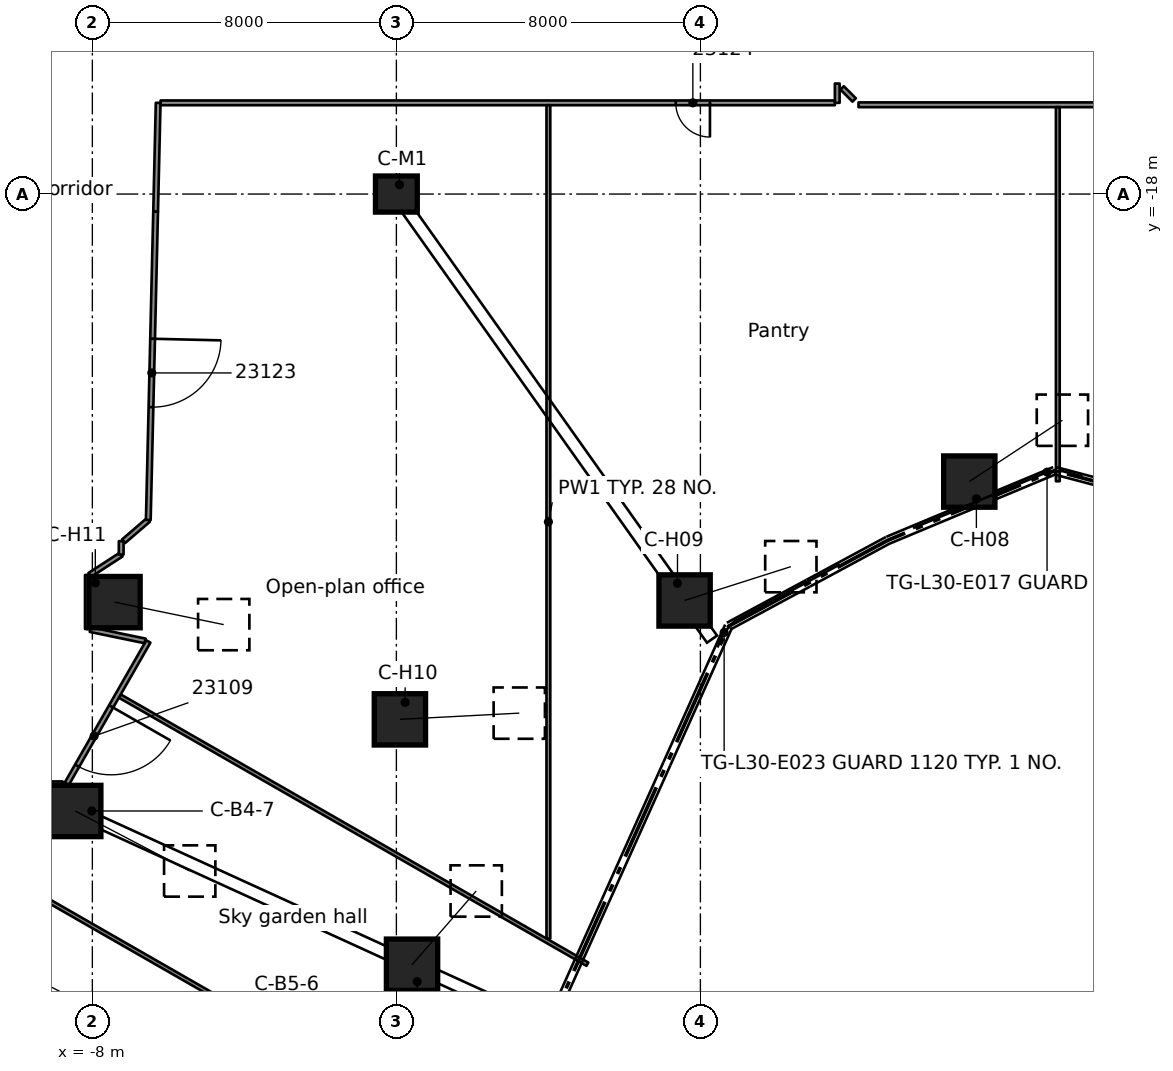
"""IFC4 building model, lengths in metres.
Left out: names, types, materials, properties, quantities, classifications, styles, units other than length and angle.
Written with IfcOpenShell. Run it as: python <this file> out.ifc"""

import sys

from ifc_helpers import new_model, si_unit, direction, frame, frame_2d, origin, origin_2d, place, context, subcontext, project, spatial, rectangle, extrude, element, fill, save


model = new_model("IFC4")
c1 = context("Model", 3, precision=1e-05, world=origin(), true_north=direction((0.0, 1.0)))
c2 = subcontext(c1, "Body", "Model", "MODEL_VIEW")
j1 = project(units=[si_unit("LENGTHUNIT", "METRE"), si_unit("PLANEANGLEUNIT", "RADIAN")], contexts=[c1])
p1 = place(None, origin())
s1 = spatial("IfcSite", under=j1, at=p1, CompositionType="ELEMENT")
p2 = place(p1, origin())
s2 = spatial("IfcBuilding", under=s1, at=p2, CompositionType="ELEMENT")
p3 = place(p2, frame((0.0, 0.0, 119.7)))
s3 = spatial("IfcBuildingStorey", under=s2, at=p3, CompositionType="ELEMENT", Elevation=119.7)
p4 = place(p3, frame((-10.639, -38.05, 0.537), z_axis=(0.704636789629, -0.368256969332, 0.606526008709), x_axis=(0.463179232644, 0.886264632289, 0.0)))
e1 = element("IfcColumn", 1, at=p4, inside=s3, PredefinedType="COLUMN", context=c2, shape_type="SweptSolid", body=[
    extrude(rectangle(XDim=1.35, YDim=1.35, at=origin_2d()), origin(), (0.0, 0.0, 1.0), 4.825),
])
p5 = place(p3, frame((-8.45, -34.233, 0.507), z_axis=(0.665591708259, -0.348954135448, 0.659711064975), x_axis=(0.464331547089, 0.88566145585, 0.0)))
e2 = element("IfcColumn", 2, at=p5, inside=s3, PredefinedType="COLUMN", context=c2, shape_type="SweptSolid", body=[
    extrude(rectangle(XDim=1.35, YDim=1.35, at=origin_2d()), origin(), (0.0, 0.0, 1.0), 4.525),
])
p6 = place(p3, frame((0.412, -38.278, 0.427), z_axis=(0.415654090465, 0.477479482065, 0.774109179178), x_axis=(-0.754249881961, 0.656587477464, 0.0)))
e3 = element("IfcColumn", 3, at=p6, inside=s3, PredefinedType="COLUMN", context=c2, shape_type="SweptSolid", body=[
    extrude(rectangle(XDim=1.35, YDim=1.35, at=origin_2d()), origin(), (0.0, 0.0, 1.0), 4.063),
])
p7 = place(p3, frame((15.076, -25.565, 0.467), z_axis=(0.57724832469, 0.380287859943, 0.722610209742), x_axis=(-0.550140625577, 0.835072028085, 0.0)))
e4 = element("IfcColumn", 4, at=p7, inside=s3, PredefinedType="COLUMN", context=c2, shape_type="SweptSolid", body=[
    extrude(rectangle(XDim=1.35, YDim=1.35, at=origin_2d()), origin(), (0.0, 0.0, 1.0), 4.244),
])
p8 = place(p3, frame((7.584, -28.694, 0.467), z_axis=(0.658720900621, 0.20971851237, 0.722568280964), x_axis=(-0.303368503341, 0.95287331329, 0.0)))
e5 = element("IfcColumn", 5, at=p8, inside=s3, PredefinedType="COLUMN", context=c2, shape_type="SweptSolid", body=[
    extrude(rectangle(XDim=1.35, YDim=1.35, at=origin_2d()), origin(), (0.0, 0.0, 1.0), 4.244),
])
p9 = place(p3, frame((0.093, -31.822, 0.486), z_axis=(0.719490424028, 0.037582399141, 0.693484746052), x_axis=(-0.052163630494, 0.998638551055, 0.0)))
e6 = element("IfcColumn", 6, at=p9, inside=s3, PredefinedType="COLUMN", context=c2, shape_type="SweptSolid", body=[
    extrude(rectangle(XDim=1.35, YDim=1.35, at=origin_2d()), origin(), (0.0, 0.0, 1.0), 4.365),
])
p10 = place(p3, frame((-7.417, -28.737, 0.467), z_axis=(0.677134223786, -0.139487809436, 0.722518092505), x_axis=(0.201760907316, 0.979434804507, 0.0)))
e7 = element("IfcColumn", 7, at=p10, inside=s3, PredefinedType="COLUMN", context=c2, shape_type="SweptSolid", body=[
    extrude(rectangle(XDim=1.35, YDim=1.35, at=origin_2d()), origin(), (0.0, 0.0, 1.0), 4.244),
])
p11 = place(p3, frame((0.0, -18.0, 0.0), z_axis=(0.0, 0.0, 1.0), x_axis=(1.0, 0.0, 0.0)))
e8 = element("IfcColumn", 8, at=p11, inside=s3, PredefinedType="COLUMN", context=c2, shape_type="SweptSolid", body=[
    extrude(rectangle(XDim=1.1, YDim=0.95, at=origin_2d()), origin(), (0.0, 0.0, 1.0), 4.0),
])
p12 = place(p3, frame((11.729, -15.207, 0.0), z_axis=(0.0, 0.0, 1.0), x_axis=(0.707106781187, -0.707106781187, 0.0)))
e9 = element("IfcWall", 9, at=p12, inside=s3, PredefinedType="PARTITIONING", context=c2, shape_type="SweptSolid", body=[
    extrude(rectangle(XDim=0.448, YDim=0.125, at=frame_2d((0.224, 0.0))), origin(), (0.0, 0.0, 1.0), 3.58),
])
p13 = place(p3, frame((-10.067, -36.073, 0.0), z_axis=(0.0, 0.0, 1.0), x_axis=(0.867487826892, -0.497458410518, 0.0)))
e10 = element("IfcWall", 10, at=p13, inside=s3, PredefinedType="PARTITIONING", context=c2, shape_type="SweptSolid", body=[
    extrude(rectangle(XDim=14.739, YDim=0.1, at=frame_2d((7.37, 0.0))), origin(), (0.0, 0.0, 1.0), 3.58),
])
p14 = place(p3, frame((-7.278, -31.209, 0.0), z_axis=(0.0, 0.0, 1.0), x_axis=(0.867510224985, -0.497419349791, 0.0)))
e11 = element("IfcWall", 11, at=p14, inside=s3, PredefinedType="PARTITIONING", context=c2, shape_type="SweptSolid", body=[
    extrude(rectangle(XDim=14.183, YDim=0.1, at=frame_2d((7.092, 0.0))), origin(), (0.0, 0.0, 1.0), 3.58),
])
p15 = place(p3, frame((-8.056, -29.46, 0.0), z_axis=(0.0, 0.0, 1.0), x_axis=(0.979345303745, -0.202194896157, 0.0)))
e12 = element("IfcWall", 12, at=p15, inside=s3, PredefinedType="PARTITIONING", context=c2, shape_type="SweptSolid", body=[
    extrude(rectangle(XDim=1.474, YDim=0.125, at=frame_2d((0.737, 0.0))), origin(), (0.0, 0.0, 1.0), 3.58),
])
p16 = place(p3, frame((-7.179, -27.136, 0.0), z_axis=(0.0, 0.0, 1.0), x_axis=(0.758010873783, 0.65224191465, 0.0)))
e13 = element("IfcWall", 13, at=p16, inside=s3, PredefinedType="PARTITIONING", context=c2, shape_type="SweptSolid", body=[
    extrude(rectangle(XDim=0.859, YDim=0.125, at=frame_2d((0.429, 0.0))), origin(), (0.0, 0.0, 1.0), 3.58),
])
p17 = place(p3, frame((-9.164, -33.518, 0.0), z_axis=(0.0, 0.0, 1.0), x_axis=(1.0, 0.0, 0.0)))
e14 = element("IfcWall", 14, at=p17, inside=s3, PredefinedType="PARTITIONING", context=c2, shape_type="SweptSolid", body=[
    extrude(rectangle(XDim=0.382, YDim=0.125, at=frame_2d((0.191, 0.0))), origin(), (0.0, 0.0, 1.0), 3.58),
])
p18 = place(p3, frame((-8.069, -28.022, 0.0), z_axis=(0.0, 0.0, 1.0), x_axis=(0.839550235138, 0.543282065486, 0.0)))
e15 = element("IfcWall", 15, at=p18, inside=s3, PredefinedType="PARTITIONING", context=c2, shape_type="SweptSolid", body=[
    extrude(rectangle(XDim=0.986, YDim=0.125, at=frame_2d((0.493, 0.0))), origin(), (0.0, 0.0, 1.0), 3.58),
])
p19 = place(p3, frame((22.575, -15.651, 0.0), z_axis=(0.0, 0.0, 1.0), x_axis=(-1.0, 0.0, 0.0)))
e16 = element("IfcWall", 16, at=p19, inside=s3, PredefinedType="PARTITIONING", context=c2, shape_type="SweptSolid", body=[
    extrude(rectangle(XDim=10.415, YDim=0.125, at=frame_2d((5.208, 0.0))), origin(), (0.0, 0.0, 1.0), 3.58),
])
p20 = place(p19, frame((2.025, 0.0, 0.0)))
e17 = element("IfcOpeningElement", 17, at=p20, cuts=e16, PredefinedType="OPENING", context=c2, shape_type="SweptSolid", body=[
    extrude(rectangle(XDim=1.1, YDim=2.1, at=frame_2d((0.55, 1.05))), frame((0.0, 0.073, 0.0), z_axis=(0.0, -1.0, 0.0), x_axis=(1.0, 0.0, 0.0)), (0.0, 0.0, 1.0), 0.145),
])
p21 = place(p3, frame((11.539, -15.6, 0.0), z_axis=(0.0, 0.0, 1.0), x_axis=(-1.0, 0.0, 0.0)))
e18 = element("IfcWall", 18, at=p21, inside=s3, PredefinedType="PARTITIONING", context=c2, shape_type="SweptSolid", body=[
    extrude(rectangle(XDim=17.744, YDim=0.125, at=frame_2d((8.872, 0.0))), origin(), (0.0, 0.0, 1.0), 3.58),
])
p22 = place(p21, frame((3.288, 0.0, 0.0)))
e19 = element("IfcOpeningElement", 19, at=p22, cuts=e18, PredefinedType="OPENING", context=c2, shape_type="SweptSolid", body=[
    extrude(rectangle(XDim=0.9, YDim=2.1, at=frame_2d((0.45, 1.05))), frame((0.0, 0.073, 0.0), z_axis=(0.0, -1.0, 0.0), x_axis=(1.0, 0.0, 0.0)), (0.0, 0.0, 1.0), 0.145),
])
p23 = place(p3, frame((-6.526, -29.773, 0.0), z_axis=(0.0, 0.0, 1.0), x_axis=(-0.497557170908, -0.867431185558, 0.0)))
e20 = element("IfcWall", 20, at=p23, inside=s3, PredefinedType="PARTITIONING", context=c2, shape_type="SweptSolid", body=[
    extrude(rectangle(XDim=4.317, YDim=0.125, at=frame_2d((2.159, 0.0))), origin(), (0.0, 0.0, 1.0), 3.58),
])
p24 = place(p23, frame((1.969, 0.0, 0.0)))
e21 = element("IfcOpeningElement", 21, at=p24, cuts=e20, PredefinedType="OPENING", context=c2, shape_type="SweptSolid", body=[
    extrude(rectangle(XDim=1.8, YDim=2.1, at=frame_2d((0.9, 1.05))), frame((0.0, 0.073, 0.0), z_axis=(0.0, -1.0, 0.0), x_axis=(1.0, 0.0, 0.0)), (0.0, 0.0, 1.0), 0.145),
])
p25 = place(p3, frame((-6.335, -18.458, 0.0), z_axis=(0.0, 0.0, 1.0), x_axis=(-0.02378203, -0.999717167527, 0.0)))
e22 = element("IfcWall", 22, at=p25, inside=s3, PredefinedType="PARTITIONING", context=c2, shape_type="SweptSolid", body=[
    extrude(rectangle(XDim=8.12, YDim=0.125, at=frame_2d((4.06, 0.0))), origin(), (0.0, 0.0, 1.0), 3.58),
])
p26 = place(p25, frame((3.35, 0.0, 0.0)))
e23 = element("IfcOpeningElement", 23, at=p26, cuts=e22, PredefinedType="OPENING", context=c2, shape_type="SweptSolid", body=[
    extrude(rectangle(XDim=1.8, YDim=2.1, at=frame_2d((0.9, 1.05))), frame((0.0, 0.073, 0.0), z_axis=(0.0, -1.0, 0.0), x_axis=(1.0, 0.0, 0.0)), (0.0, 0.0, 1.0), 0.145),
])
p27 = place(p3, frame((-6.335, -18.458, 0.0), z_axis=(0.0, 0.0, 1.0), x_axis=(0.023400390527, 0.999726173371, 0.0)))
e24 = element("IfcWall", 24, at=p27, inside=s3, PredefinedType="PARTITIONING", context=c2, shape_type="SweptSolid", body=[
    extrude(rectangle(XDim=2.859, YDim=0.125, at=frame_2d((1.429, 0.0))), origin(), (0.0, 0.0, 1.0), 3.58),
])
p28 = place(p3, frame((17.405, -25.557, 0.0), z_axis=(0.0, 0.0, 1.0), x_axis=(0.0, 1.0, 0.0)))
e25 = element("IfcWall", 25, at=p28, inside=s3, PredefinedType="PARTITIONING", context=c2, shape_type="SweptSolid", body=[
    extrude(rectangle(XDim=9.844, YDim=0.1, at=frame_2d((4.922, 0.0))), origin(), (0.0, 0.0, 1.0), 3.58),
])
p29 = place(p3, frame((11.601, -15.6, 0.0), z_axis=(0.0, 0.0, 1.0), x_axis=(0.0, 1.0, 0.0)))
e26 = element("IfcWall", 26, at=p29, inside=s3, PredefinedType="PARTITIONING", context=c2, shape_type="SweptSolid", body=[
    extrude(rectangle(XDim=0.508, YDim=0.125, at=frame_2d((0.254, 0.0))), origin(), (0.0, 0.0, 1.0), 3.58),
])
p30 = place(p3, frame((4.0, -37.59, 0.0), z_axis=(0.0, 0.0, 1.0), x_axis=(0.0, 1.0, 0.0)))
e27 = element("IfcWall", 27, at=p30, inside=s3, PredefinedType="PARTITIONING", context=c2, shape_type="SweptSolid", body=[
    extrude(rectangle(XDim=21.928, YDim=0.1, at=frame_2d((10.964, 0.0))), origin(), (0.0, 0.0, 1.0), 3.58),
])
p31 = place(p3, frame((-7.241, -27.486, 0.0), z_axis=(0.0, 0.0, 1.0), x_axis=(0.0, 1.0, 0.0)))
e28 = element("IfcWall", 28, at=p31, inside=s3, PredefinedType="PARTITIONING", context=c2, shape_type="SweptSolid", body=[
    extrude(rectangle(XDim=0.352, YDim=0.125, at=frame_2d((0.176, 0.0))), origin(), (0.0, 0.0, 1.0), 3.58),
])
p32 = place(p3, frame((-8.131, -29.444, 0.0), z_axis=(0.0, 0.0, 1.0), x_axis=(0.0, 1.0, 0.0)))
e29 = element("IfcWall", 29, at=p32, inside=s3, PredefinedType="PARTITIONING", context=c2, shape_type="SweptSolid", body=[
    extrude(rectangle(XDim=1.422, YDim=0.125, at=frame_2d((0.711, 0.0))), origin(), (0.0, 0.0, 1.0), 3.58),
])
p33 = place(p24, origin())
e30 = element("IfcDoor", 30, at=p33, inside=s3, OperationType="DOUBLE_DOOR_SINGLE_SWING", PredefinedType="DOOR", context=c2, shape_type="SweptSolid", body=[
    extrude(rectangle(XDim=1.8, YDim=2.1, at=frame_2d((0.9, 1.05))), frame((0.0, 0.025, 0.0), z_axis=(0.0, -1.0, 0.0), x_axis=(1.0, 0.0, 0.0)), (0.0, 0.0, 1.0), 0.05),
])
fill(e21, e30)
p34 = place(p26, origin())
e31 = element("IfcDoor", 31, at=p34, inside=s3, OperationType="DOUBLE_DOOR_SINGLE_SWING", PredefinedType="DOOR", context=c2, shape_type="SweptSolid", body=[
    extrude(rectangle(XDim=1.8, YDim=2.1, at=frame_2d((0.9, 1.05))), frame((0.0, 0.025, 0.0), z_axis=(0.0, -1.0, 0.0), x_axis=(1.0, 0.0, 0.0)), (0.0, 0.0, 1.0), 0.05),
])
fill(e23, e31)
p35 = place(p22, origin())
e32 = element("IfcDoor", 32, at=p35, inside=s3, OperationType="SINGLE_SWING_LEFT", PredefinedType="DOOR", context=c2, shape_type="SweptSolid", body=[
    extrude(rectangle(XDim=0.9, YDim=2.1, at=frame_2d((0.45, 1.05))), frame((0.0, 0.025, 0.0), z_axis=(0.0, -1.0, 0.0), x_axis=(1.0, 0.0, 0.0)), (0.0, 0.0, 1.0), 0.05),
])
fill(e19, e32)
save(model, sys.argv[1])
